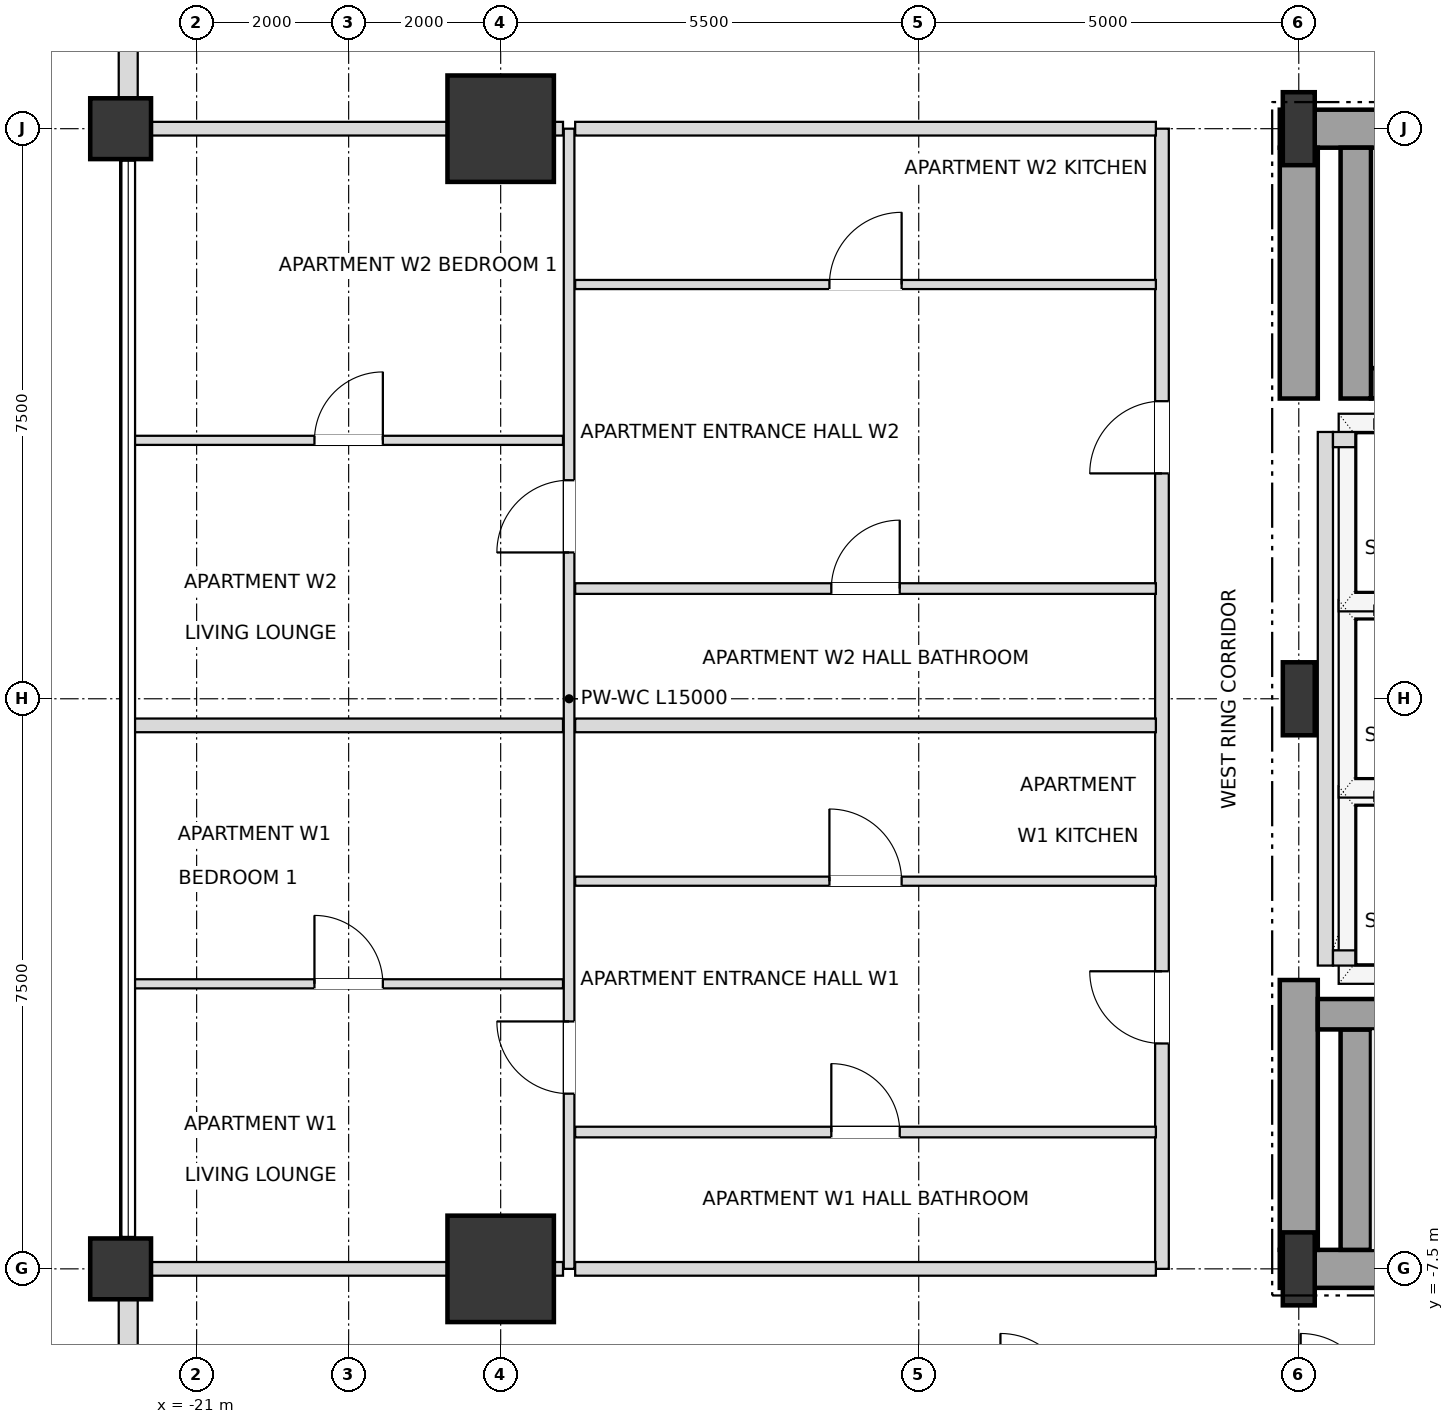
"""IFC4 building model, lengths in metres.
Left out: names, types, materials, properties, quantities, classifications, styles, units other than length and angle.
Written with IfcOpenShell. Run it as: python <this file> out.ifc"""

import sys

from ifc_helpers import new_model, si_unit, direction, frame, frame_2d, origin, origin_2d, place, context, subcontext, project, spatial, rectangle, i_section, extrude, element, fill, save


model = new_model("IFC4")
c1 = context("Model", 3, precision=1e-05, world=origin(), true_north=direction((0.0, 1.0)))
c2 = subcontext(c1, "Body", "Model", "MODEL_VIEW")
j1 = project(units=[si_unit("LENGTHUNIT", "METRE"), si_unit("PLANEANGLEUNIT", "RADIAN")], contexts=[c1])
p1 = place(None, origin())
s1 = spatial("IfcSite", under=j1, at=p1, CompositionType="ELEMENT")
p2 = place(p1, origin())
s2 = spatial("IfcBuilding", under=s1, at=p2, CompositionType="ELEMENT")
p3 = place(p2, frame((0.0, 0.0, 32.4)))
s3 = spatial("IfcBuildingStorey", under=s2, at=p3, CompositionType="ELEMENT", Elevation=32.4)
for number, where, z_axis, x_axis in (
    (1, (-6.5, -7.5, 0.0), (0.0, 0.0, 1.0), (1.0, 0.0, 0.0)),
    (2, (-6.5, 0.0, 0.0), (0.0, 0.0, 1.0), (1.0, 0.0, 0.0)),
    (3, (-6.5, 7.5, 0.0), (0.0, 0.0, 1.0), (1.0, 0.0, 0.0)),
):
    element("IfcColumn", number, at=place(p3, frame(where, z_axis=z_axis, x_axis=x_axis)), inside=s3, PredefinedType="COLUMN", context=c2, shape_type="SweptSolid", body=[
        extrude(i_section(OverallWidth=0.42, OverallDepth=0.96, WebThickness=0.022, FlangeThickness=0.034, at=origin_2d()), origin(), (0.0, 0.0, 1.0), 3.6),
    ])
for number, where, z_axis, x_axis in (
    (4, (-17.0, 7.5, 0.0), (0.0, 0.0, 1.0), (1.0, 0.0, 0.0)),
    (5, (-17.0, -7.5, 0.0), (0.0, 0.0, 1.0), (1.0, 0.0, 0.0)),
):
    element("IfcColumn", number, at=place(p3, frame(where, z_axis=z_axis, x_axis=x_axis)), inside=s3, PredefinedType="USERDEFINED", context=c2, shape_type="SweptSolid", body=[
        extrude(rectangle(XDim=1.4, YDim=1.4, at=origin_2d()), origin(), (0.0, 0.0, 1.0), 3.6),
    ])
for number, where, z_axis, x_axis in (
    (6, (-22.0, -7.5, 0.0), (0.0, 0.0, 1.0), (1.0, 0.0, 0.0)),
    (7, (-22.0, 7.5, 0.0), (0.0, 0.0, 1.0), (1.0, 0.0, 0.0)),
):
    element("IfcColumn", number, at=place(p3, frame(where, z_axis=z_axis, x_axis=x_axis)), inside=s3, PredefinedType="COLUMN", context=c2, shape_type="SweptSolid", body=[
        extrude(rectangle(XDim=0.8, YDim=0.8, at=origin_2d()), origin(), (0.0, 0.0, 1.0), 3.6),
    ])
p4 = place(p3, frame((-21.9, 12.605, 0.0), z_axis=(0.0, 0.0, 1.0), x_axis=(0.0, -1.0, 0.0)))
e8 = element("IfcWall", 8, at=p4, inside=s3, PredefinedType="SOLIDWALL", context=c2, shape_type="SweptSolid", body=[
    extrude(rectangle(XDim=4.71, YDim=0.25, at=frame_2d((2.355, 0.0))), origin(), (0.0, 0.0, 1.0), 2.736),
])
p5 = place(p4, frame((1.455, 0.0, 0.72)))
e9 = element("IfcOpeningElement", 9, at=p5, cuts=e8, PredefinedType="OPENING", context=c2, shape_type="SweptSolid", body=[
    extrude(rectangle(XDim=1.8, YDim=1.68, at=frame_2d((0.9, 0.84))), frame((0.0, 0.135, 0.0), z_axis=(0.0, -1.0, 0.0), x_axis=(1.0, 0.0, 0.0)), (0.0, 0.0, 1.0), 0.27),
])
p6 = place(p3, frame((-21.9, -7.895, 0.0), z_axis=(0.0, 0.0, 1.0), x_axis=(0.0, -1.0, 0.0)))
e10 = element("IfcWall", 10, at=p6, inside=s3, PredefinedType="SOLIDWALL", context=c2, shape_type="SweptSolid", body=[
    extrude(rectangle(XDim=4.71, YDim=0.25, at=frame_2d((2.355, 0.0))), origin(), (0.0, 0.0, 1.0), 2.736),
])
p7 = place(p6, frame((1.455, 0.0, 0.72)))
e11 = element("IfcOpeningElement", 11, at=p7, cuts=e10, PredefinedType="OPENING", context=c2, shape_type="SweptSolid", body=[
    extrude(rectangle(XDim=1.8, YDim=1.68, at=frame_2d((0.9, 0.84))), frame((0.0, 0.135, 0.0), z_axis=(0.0, -1.0, 0.0), x_axis=(1.0, 0.0, 0.0)), (0.0, 0.0, 1.0), 0.27),
])
p8 = place(p3, frame((-6.75, -7.5, 0.0), z_axis=(0.0, 0.0, 1.0), x_axis=(1.0, 0.0, 0.0)))
e12 = element("IfcWall", 12, at=p8, inside=s3, PredefinedType="SHEAR", context=c2, shape_type="SweptSolid", body=[
    extrude(rectangle(XDim=6.75, YDim=0.5, at=frame_2d((3.375, 0.0))), origin(), (0.0, 0.0, 1.0), 3.38),
])
p9 = place(p3, frame((-6.75, 7.5, 0.0), z_axis=(0.0, 0.0, 1.0), x_axis=(1.0, 0.0, 0.0)))
e13 = element("IfcWall", 13, at=p9, inside=s3, PredefinedType="SHEAR", context=c2, shape_type="SweptSolid", body=[
    extrude(rectangle(XDim=6.75, YDim=0.5, at=frame_2d((3.375, 0.0))), origin(), (0.0, 0.0, 1.0), 3.38),
])
p10 = place(p9, frame((1.65, 0.0, 0.0)))
e14 = element("IfcOpeningElement", 14, at=p10, cuts=e13, PredefinedType="OPENING", context=c2, shape_type="SweptSolid", body=[
    extrude(rectangle(XDim=1.05, YDim=2.15, at=frame_2d((0.525, 1.075))), frame((0.0, 0.26, 0.0), z_axis=(0.0, -1.0, 0.0), x_axis=(1.0, 0.0, 0.0)), (0.0, 0.0, 1.0), 0.52),
])
p11 = place(p3, frame((-6.5, -7.25, 0.0), z_axis=(0.0, 0.0, 1.0), x_axis=(0.0, 1.0, 0.0)))
e15 = element("IfcWall", 15, at=p11, inside=s3, PredefinedType="SHEAR", context=c2, shape_type="SweptSolid", body=[
    extrude(rectangle(XDim=3.55, YDim=0.5, at=frame_2d((1.775, 0.0))), origin(), (0.0, 0.0, 1.0), 3.38),
])
p12 = place(p3, frame((-6.5, 3.95, 0.0), z_axis=(0.0, 0.0, 1.0), x_axis=(0.0, 1.0, 0.0)))
e16 = element("IfcWall", 16, at=p12, inside=s3, PredefinedType="SHEAR", context=c2, shape_type="SweptSolid", body=[
    extrude(rectangle(XDim=3.3, YDim=0.5, at=frame_2d((1.65, 0.0))), origin(), (0.0, 0.0, 1.0), 3.38),
])
p13 = place(p3, frame((-5.75, -7.25, 0.0), z_axis=(0.0, 0.0, 1.0), x_axis=(0.0, 1.0, 0.0)))
e17 = element("IfcWall", 17, at=p13, inside=s3, PredefinedType="SHEAR", context=c2, shape_type="SweptSolid", body=[
    extrude(rectangle(XDim=2.9, YDim=0.4, at=frame_2d((1.45, 0.0))), origin(), (0.0, 0.0, 1.0), 3.38),
])
p14 = place(p3, frame((-6.25, -4.15, 0.0), z_axis=(0.0, 0.0, 1.0), x_axis=(1.0, 0.0, 0.0)))
e18 = element("IfcWall", 18, at=p14, inside=s3, PredefinedType="SHEAR", context=c2, shape_type="SweptSolid", body=[
    extrude(rectangle(XDim=7.78, YDim=0.4, at=frame_2d((3.89, 0.0))), origin(), (0.0, 0.0, 1.0), 3.38),
])
p15 = place(p3, frame((-5.55, 4.15, 0.0), z_axis=(0.0, 0.0, 1.0), x_axis=(1.0, 0.0, 0.0)))
e19 = element("IfcWall", 19, at=p15, inside=s3, PredefinedType="SHEAR", context=c2, shape_type="SweptSolid", body=[
    extrude(rectangle(XDim=7.08, YDim=0.4, at=frame_2d((3.54, 0.0))), origin(), (0.0, 0.0, 1.0), 3.38),
])
p16 = place(p3, frame((-5.75, 3.95, 0.0), z_axis=(0.0, 0.0, 1.0), x_axis=(0.0, 1.0, 0.0)))
e20 = element("IfcWall", 20, at=p16, inside=s3, PredefinedType="SHEAR", context=c2, shape_type="SweptSolid", body=[
    extrude(rectangle(XDim=3.3, YDim=0.4, at=frame_2d((1.65, 0.0))), origin(), (0.0, 0.0, 1.0), 3.38),
])
p17 = place(p3, frame((-6.15, -3.51, 0.0), z_axis=(0.0, 0.0, 1.0), x_axis=(0.0, 1.0, 0.0)))
e21 = element("IfcWall", 21, at=p17, inside=s3, PredefinedType="SOLIDWALL", context=c2, shape_type="SweptSolid", body=[
    extrude(rectangle(XDim=7.02, YDim=0.2, at=frame_2d((3.51, 0.0))), origin(), (0.0, 0.0, 1.0), 3.38),
])
for number, where, z_axis, x_axis in (
    (22, (-6.05, -3.41, 0.0), (0.0, 0.0, 1.0), (1.0, 0.0, 0.0)),
    (23, (-6.05, 3.41, 0.0), (0.0, 0.0, 1.0), (1.0, 0.0, 0.0)),
):
    element("IfcWall", number, at=place(p3, frame(where, z_axis=z_axis, x_axis=x_axis)), inside=s3, PredefinedType="SOLIDWALL", context=c2, shape_type="SweptSolid", body=[
        extrude(rectangle(XDim=2.2, YDim=0.2, at=frame_2d((1.1, 0.0))), origin(), (0.0, 0.0, 1.0), 3.38),
    ])
p18 = place(p3, frame((-16.1, -7.5, 0.0), z_axis=(0.0, 0.0, 1.0), x_axis=(0.0, 1.0, 0.0)))
e24 = element("IfcWall", 24, at=p18, inside=s3, PredefinedType="PARTITIONING", context=c2, shape_type="SweptSolid", body=[
    extrude(rectangle(XDim=15.0, YDim=0.14, at=frame_2d((7.5, 0.0))), origin(), (0.0, 0.0, 1.0), 3.38),
])
p19 = place(p18, frame((2.305, 0.0, 0.0)))
e25 = element("IfcOpeningElement", 25, at=p19, cuts=e24, PredefinedType="OPENING", context=c2, shape_type="SweptSolid", body=[
    extrude(rectangle(XDim=0.95, YDim=2.1, at=frame_2d((0.475, 1.05))), frame((0.0, 0.08, 0.0), z_axis=(0.0, -1.0, 0.0), x_axis=(1.0, 0.0, 0.0)), (0.0, 0.0, 1.0), 0.16),
])
p20 = place(p18, frame((9.425, 0.0, 0.0)))
e26 = element("IfcOpeningElement", 26, at=p20, cuts=e24, PredefinedType="OPENING", context=c2, shape_type="SweptSolid", body=[
    extrude(rectangle(XDim=0.95, YDim=2.1, at=frame_2d((0.475, 1.05))), frame((0.0, 0.08, 0.0), z_axis=(0.0, -1.0, 0.0), x_axis=(1.0, 0.0, 0.0)), (0.0, 0.0, 1.0), 0.16),
])
p21 = place(p3, frame((-8.3, -7.5, 0.0), z_axis=(0.0, 0.0, 1.0), x_axis=(0.0, 1.0, 0.0)))
e27 = element("IfcWall", 27, at=p21, inside=s3, PredefinedType="PARTITIONING", context=c2, shape_type="SweptSolid", body=[
    extrude(rectangle(XDim=15.0, YDim=0.18, at=frame_2d((7.5, 0.0))), origin(), (0.0, 0.0, 1.0), 3.38),
])
p22 = place(p21, frame((2.965, 0.0, 0.0)))
e28 = element("IfcOpeningElement", 28, at=p22, cuts=e27, PredefinedType="OPENING", context=c2, shape_type="SweptSolid", body=[
    extrude(rectangle(XDim=0.95, YDim=2.15, at=frame_2d((0.475, 1.075))), frame((0.0, 0.1, 0.0), z_axis=(0.0, -1.0, 0.0), x_axis=(1.0, 0.0, 0.0)), (0.0, 0.0, 1.0), 0.2),
])
p23 = place(p21, frame((10.465, 0.0, 0.0)))
e29 = element("IfcOpeningElement", 29, at=p23, cuts=e27, PredefinedType="OPENING", context=c2, shape_type="SweptSolid", body=[
    extrude(rectangle(XDim=0.95, YDim=2.15, at=frame_2d((0.475, 1.075))), frame((0.0, 0.1, 0.0), z_axis=(0.0, -1.0, 0.0), x_axis=(1.0, 0.0, 0.0)), (0.0, 0.0, 1.0), 0.2),
])
p24 = place(p3, frame((-21.9, -7.5, 0.0), z_axis=(0.0, 0.0, 1.0), x_axis=(1.0, 0.0, 0.0)))
e30 = element("IfcWall", 30, at=p24, inside=s3, PredefinedType="PARTITIONING", context=c2, shape_type="SweptSolid", body=[
    extrude(rectangle(XDim=5.72, YDim=0.18, at=frame_2d((2.86, 0.0))), origin(), (0.0, 0.0, 1.0), 2.816),
])
p25 = place(p3, frame((-16.02, -7.5, 0.0), z_axis=(0.0, 0.0, 1.0), x_axis=(1.0, 0.0, 0.0)))
e31 = element("IfcWall", 31, at=p25, inside=s3, PredefinedType="PARTITIONING", context=c2, shape_type="SweptSolid", body=[
    extrude(rectangle(XDim=7.64, YDim=0.18, at=frame_2d((3.82, 0.0))), origin(), (0.0, 0.0, 1.0), 2.816),
])
p26 = place(p3, frame((-16.02, -5.7, 0.0), z_axis=(0.0, 0.0, 1.0), x_axis=(1.0, 0.0, 0.0)))
e32 = element("IfcWall", 32, at=p26, inside=s3, PredefinedType="PARTITIONING", context=c2, shape_type="SweptSolid", body=[
    extrude(rectangle(XDim=7.64, YDim=0.14, at=frame_2d((3.82, 0.0))), origin(), (0.0, 0.0, 1.0), 2.948),
])
p27 = place(p26, frame((3.37, 0.0, 0.0)))
e33 = element("IfcOpeningElement", 33, at=p27, cuts=e32, PredefinedType="OPENING", context=c2, shape_type="SweptSolid", body=[
    extrude(rectangle(XDim=0.9, YDim=2.1, at=frame_2d((0.45, 1.05))), frame((0.0, 0.08, 0.0), z_axis=(0.0, -1.0, 0.0), x_axis=(1.0, 0.0, 0.0)), (0.0, 0.0, 1.0), 0.16),
])
p28 = place(p3, frame((-21.82, -3.75, 0.0), z_axis=(0.0, 0.0, 1.0), x_axis=(1.0, 0.0, 0.0)))
e34 = element("IfcWall", 34, at=p28, inside=s3, PredefinedType="PARTITIONING", context=c2, shape_type="SweptSolid", body=[
    extrude(rectangle(XDim=5.64, YDim=0.12, at=frame_2d((2.82, 0.0))), origin(), (0.0, 0.0, 1.0), 2.816),
])
p29 = place(p28, frame((2.37, 0.0, 0.0)))
e35 = element("IfcOpeningElement", 35, at=p29, cuts=e34, PredefinedType="OPENING", context=c2, shape_type="SweptSolid", body=[
    extrude(rectangle(XDim=0.9, YDim=2.1, at=frame_2d((0.45, 1.05))), frame((0.0, 0.07, 0.0), z_axis=(0.0, -1.0, 0.0), x_axis=(1.0, 0.0, 0.0)), (0.0, 0.0, 1.0), 0.14),
])
p30 = place(p3, frame((-16.02, -2.4, 0.0), z_axis=(0.0, 0.0, 1.0), x_axis=(1.0, 0.0, 0.0)))
e36 = element("IfcWall", 36, at=p30, inside=s3, PredefinedType="PARTITIONING", context=c2, shape_type="SweptSolid", body=[
    extrude(rectangle(XDim=7.64, YDim=0.12, at=frame_2d((3.82, 0.0))), origin(), (0.0, 0.0, 1.0), 2.948),
])
p31 = place(p30, frame((3.345, 0.0, 0.0)))
e37 = element("IfcOpeningElement", 37, at=p31, cuts=e36, PredefinedType="OPENING", context=c2, shape_type="SweptSolid", body=[
    extrude(rectangle(XDim=0.95, YDim=2.1, at=frame_2d((0.475, 1.05))), frame((0.0, 0.07, 0.0), z_axis=(0.0, -1.0, 0.0), x_axis=(1.0, 0.0, 0.0)), (0.0, 0.0, 1.0), 0.14),
])
p32 = place(p3, frame((-21.82, -0.35, 0.0), z_axis=(0.0, 0.0, 1.0), x_axis=(1.0, 0.0, 0.0)))
e38 = element("IfcWall", 38, at=p32, inside=s3, PredefinedType="PARTITIONING", context=c2, shape_type="SweptSolid", body=[
    extrude(rectangle(XDim=5.64, YDim=0.18, at=frame_2d((2.82, 0.0))), origin(), (0.0, 0.0, 1.0), 2.816),
])
p33 = place(p3, frame((-16.02, -0.35, 0.0), z_axis=(0.0, 0.0, 1.0), x_axis=(1.0, 0.0, 0.0)))
e39 = element("IfcWall", 39, at=p33, inside=s3, PredefinedType="PARTITIONING", context=c2, shape_type="SweptSolid", body=[
    extrude(rectangle(XDim=7.64, YDim=0.18, at=frame_2d((3.82, 0.0))), origin(), (0.0, 0.0, 1.0), 2.948),
])
p34 = place(p3, frame((-16.02, 1.45, 0.0), z_axis=(0.0, 0.0, 1.0), x_axis=(1.0, 0.0, 0.0)))
e40 = element("IfcWall", 40, at=p34, inside=s3, PredefinedType="PARTITIONING", context=c2, shape_type="SweptSolid", body=[
    extrude(rectangle(XDim=7.64, YDim=0.14, at=frame_2d((3.82, 0.0))), origin(), (0.0, 0.0, 1.0), 2.948),
])
p35 = place(p34, frame((3.37, 0.0, 0.0)))
e41 = element("IfcOpeningElement", 41, at=p35, cuts=e40, PredefinedType="OPENING", context=c2, shape_type="SweptSolid", body=[
    extrude(rectangle(XDim=0.9, YDim=2.1, at=frame_2d((0.45, 1.05))), frame((0.0, 0.08, 0.0), z_axis=(0.0, -1.0, 0.0), x_axis=(1.0, 0.0, 0.0)), (0.0, 0.0, 1.0), 0.16),
])
p36 = place(p3, frame((-21.82, 3.4, 0.0), z_axis=(0.0, 0.0, 1.0), x_axis=(1.0, 0.0, 0.0)))
e42 = element("IfcWall", 42, at=p36, inside=s3, PredefinedType="PARTITIONING", context=c2, shape_type="SweptSolid", body=[
    extrude(rectangle(XDim=5.64, YDim=0.12, at=frame_2d((2.82, 0.0))), origin(), (0.0, 0.0, 1.0), 2.816),
])
p37 = place(p36, frame((2.37, 0.0, 0.0)))
e43 = element("IfcOpeningElement", 43, at=p37, cuts=e42, PredefinedType="OPENING", context=c2, shape_type="SweptSolid", body=[
    extrude(rectangle(XDim=0.9, YDim=2.1, at=frame_2d((0.45, 1.05))), frame((0.0, 0.07, 0.0), z_axis=(0.0, -1.0, 0.0), x_axis=(1.0, 0.0, 0.0)), (0.0, 0.0, 1.0), 0.14),
])
p38 = place(p3, frame((-16.02, 5.45, 0.0), z_axis=(0.0, 0.0, 1.0), x_axis=(1.0, 0.0, 0.0)))
e44 = element("IfcWall", 44, at=p38, inside=s3, PredefinedType="PARTITIONING", context=c2, shape_type="SweptSolid", body=[
    extrude(rectangle(XDim=7.64, YDim=0.12, at=frame_2d((3.82, 0.0))), origin(), (0.0, 0.0, 1.0), 2.948),
])
p39 = place(p38, frame((3.345, 0.0, 0.0)))
e45 = element("IfcOpeningElement", 45, at=p39, cuts=e44, PredefinedType="OPENING", context=c2, shape_type="SweptSolid", body=[
    extrude(rectangle(XDim=0.95, YDim=2.1, at=frame_2d((0.475, 1.05))), frame((0.0, 0.07, 0.0), z_axis=(0.0, -1.0, 0.0), x_axis=(1.0, 0.0, 0.0)), (0.0, 0.0, 1.0), 0.14),
])
p40 = place(p3, frame((-21.9, 7.5, 0.0), z_axis=(0.0, 0.0, 1.0), x_axis=(1.0, 0.0, 0.0)))
e46 = element("IfcWall", 46, at=p40, inside=s3, PredefinedType="PARTITIONING", context=c2, shape_type="SweptSolid", body=[
    extrude(rectangle(XDim=5.72, YDim=0.18, at=frame_2d((2.86, 0.0))), origin(), (0.0, 0.0, 1.0), 2.816),
])
p41 = place(p3, frame((-16.02, 7.5, 0.0), z_axis=(0.0, 0.0, 1.0), x_axis=(1.0, 0.0, 0.0)))
e47 = element("IfcWall", 47, at=p41, inside=s3, PredefinedType="PARTITIONING", context=c2, shape_type="SweptSolid", body=[
    extrude(rectangle(XDim=7.64, YDim=0.18, at=frame_2d((3.82, 0.0))), origin(), (0.0, 0.0, 1.0), 2.816),
])
p42 = place(p27, origin())
e48 = element("IfcDoor", 48, at=p42, inside=s3, OperationType="SINGLE_SWING_LEFT", PredefinedType="DOOR", context=c2, shape_type="SweptSolid", body=[
    extrude(rectangle(XDim=0.9, YDim=2.1, at=frame_2d((0.45, 1.05))), frame((0.0, 0.025, 0.0), z_axis=(0.0, -1.0, 0.0), x_axis=(1.0, 0.0, 0.0)), (0.0, 0.0, 1.0), 0.05),
])
fill(e33, e48)
p43 = place(p22, origin())
e49 = element("IfcDoor", 49, at=p43, inside=s3, OperationType="SINGLE_SWING_RIGHT", PredefinedType="DOOR", context=c2, shape_type="SweptSolid", body=[
    extrude(rectangle(XDim=0.95, YDim=2.15, at=frame_2d((0.475, 1.075))), frame((0.0, 0.025, 0.0), z_axis=(0.0, -1.0, 0.0), x_axis=(1.0, 0.0, 0.0)), (0.0, 0.0, 1.0), 0.05),
])
fill(e28, e49)
p44 = place(p31, origin())
e50 = element("IfcDoor", 50, at=p44, inside=s3, OperationType="SINGLE_SWING_LEFT", PredefinedType="DOOR", context=c2, shape_type="SweptSolid", body=[
    extrude(rectangle(XDim=0.95, YDim=2.1, at=frame_2d((0.475, 1.05))), frame((0.0, 0.025, 0.0), z_axis=(0.0, -1.0, 0.0), x_axis=(1.0, 0.0, 0.0)), (0.0, 0.0, 1.0), 0.05),
])
fill(e37, e50)
p45 = place(p19, origin())
e51 = element("IfcDoor", 51, at=p45, inside=s3, OperationType="SINGLE_SWING_RIGHT", PredefinedType="DOOR", context=c2, shape_type="SweptSolid", body=[
    extrude(rectangle(XDim=0.95, YDim=2.1, at=frame_2d((0.475, 1.05))), frame((0.0, 0.025, 0.0), z_axis=(0.0, -1.0, 0.0), x_axis=(1.0, 0.0, 0.0)), (0.0, 0.0, 1.0), 0.05),
])
fill(e25, e51)
p46 = place(p29, origin())
e52 = element("IfcDoor", 52, at=p46, inside=s3, OperationType="SINGLE_SWING_LEFT", PredefinedType="DOOR", context=c2, shape_type="SweptSolid", body=[
    extrude(rectangle(XDim=0.9, YDim=2.1, at=frame_2d((0.45, 1.05))), frame((0.0, 0.025, 0.0), z_axis=(0.0, -1.0, 0.0), x_axis=(1.0, 0.0, 0.0)), (0.0, 0.0, 1.0), 0.05),
])
fill(e35, e52)
p47 = place(p35, origin())
e53 = element("IfcDoor", 53, at=p47, inside=s3, OperationType="SINGLE_SWING_RIGHT", PredefinedType="DOOR", context=c2, shape_type="SweptSolid", body=[
    extrude(rectangle(XDim=0.9, YDim=2.1, at=frame_2d((0.45, 1.05))), frame((0.0, 0.025, 0.0), z_axis=(0.0, -1.0, 0.0), x_axis=(1.0, 0.0, 0.0)), (0.0, 0.0, 1.0), 0.05),
])
fill(e41, e53)
p48 = place(p23, origin())
e54 = element("IfcDoor", 54, at=p48, inside=s3, OperationType="SINGLE_SWING_LEFT", PredefinedType="DOOR", context=c2, shape_type="SweptSolid", body=[
    extrude(rectangle(XDim=0.95, YDim=2.15, at=frame_2d((0.475, 1.075))), frame((0.0, 0.025, 0.0), z_axis=(0.0, -1.0, 0.0), x_axis=(1.0, 0.0, 0.0)), (0.0, 0.0, 1.0), 0.05),
])
fill(e29, e54)
p49 = place(p39, origin())
e55 = element("IfcDoor", 55, at=p49, inside=s3, OperationType="SINGLE_SWING_RIGHT", PredefinedType="DOOR", context=c2, shape_type="SweptSolid", body=[
    extrude(rectangle(XDim=0.95, YDim=2.1, at=frame_2d((0.475, 1.05))), frame((0.0, 0.025, 0.0), z_axis=(0.0, -1.0, 0.0), x_axis=(1.0, 0.0, 0.0)), (0.0, 0.0, 1.0), 0.05),
])
fill(e45, e55)
p50 = place(p20, origin())
e56 = element("IfcDoor", 56, at=p50, inside=s3, OperationType="SINGLE_SWING_LEFT", PredefinedType="DOOR", context=c2, shape_type="SweptSolid", body=[
    extrude(rectangle(XDim=0.95, YDim=2.1, at=frame_2d((0.475, 1.05))), frame((0.0, 0.025, 0.0), z_axis=(0.0, -1.0, 0.0), x_axis=(1.0, 0.0, 0.0)), (0.0, 0.0, 1.0), 0.05),
])
fill(e26, e56)
p51 = place(p37, origin())
e57 = element("IfcDoor", 57, at=p51, inside=s3, OperationType="SINGLE_SWING_RIGHT", PredefinedType="DOOR", context=c2, shape_type="SweptSolid", body=[
    extrude(rectangle(XDim=0.9, YDim=2.1, at=frame_2d((0.45, 1.05))), frame((0.0, 0.025, 0.0), z_axis=(0.0, -1.0, 0.0), x_axis=(1.0, 0.0, 0.0)), (0.0, 0.0, 1.0), 0.05),
])
fill(e43, e57)
save(model, sys.argv[1])
